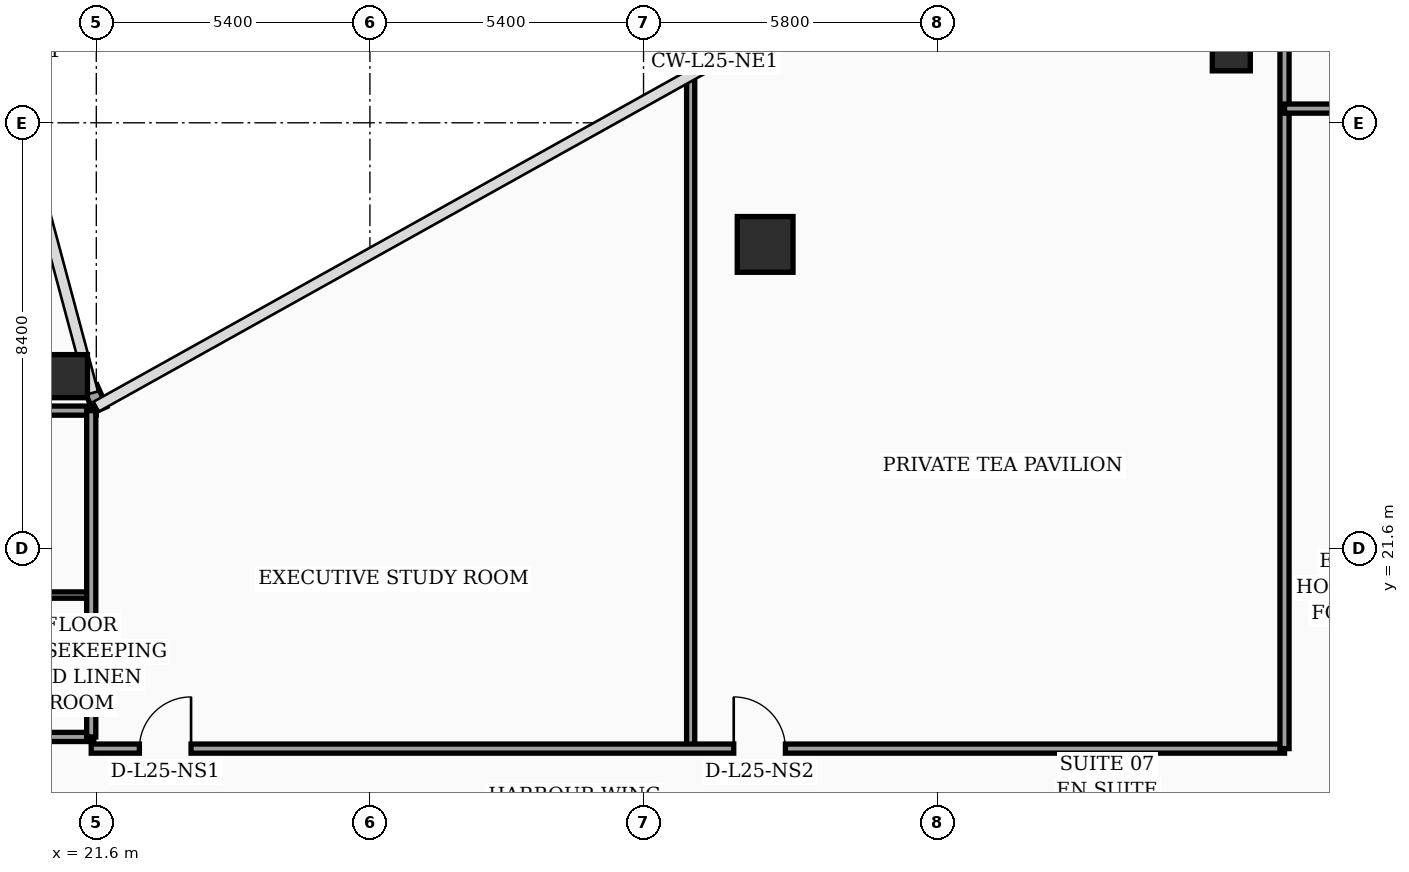
"""IFC4 building model, lengths in metres.
Left out: names, types, materials, properties, quantities, classifications, styles, units other than length and angle.
Written with IfcOpenShell. Run it as: python <this file> out.ifc"""

import sys

from ifc_helpers import new_model, si_unit, direction, frame, frame_2d, origin, origin_2d, place, context, subcontext, project, spatial, rectangle, hollow_rectangle, circle, extrude, element, fill, save


model = new_model("IFC4")
c1 = context("Model", 3, precision=1e-05, world=origin(), true_north=direction((0.0, 1.0)))
c2 = subcontext(c1, "Body", "Model", "MODEL_VIEW")
j1 = project(units=[si_unit("LENGTHUNIT", "METRE"), si_unit("PLANEANGLEUNIT", "RADIAN")], contexts=[c1])
p1 = place(None, origin())
s1 = spatial("IfcSite", under=j1, at=p1, CompositionType="ELEMENT")
p2 = place(p1, origin())
s2 = spatial("IfcBuilding", under=s1, at=p2, CompositionType="ELEMENT")
p3 = place(p2, frame((0.0, 0.0, 105.0)))
s3 = spatial("IfcBuildingStorey", under=s2, at=p3, CompositionType="ELEMENT", Elevation=105.0)
p4 = place(p3, frame((21.0, 25.0, 0.0), z_axis=(0.0, 0.0, 1.0), x_axis=(1.0, 0.0, 0.0)))
e1 = element("IfcColumn", 1, at=p4, inside=s3, PredefinedType="COLUMN", context=c2, shape_type="SweptSolid", body=[
    extrude(hollow_rectangle(XDim=0.85, YDim=0.85, WallThickness=0.036, at=origin_2d()), origin(), (0.0, 0.0, 1.0), 3.56),
])
p5 = place(p3, frame((34.8, 27.6, 0.0), z_axis=(0.0, 0.0, 1.0), x_axis=(1.0, 0.0, 0.0)))
e2 = element("IfcColumn", 2, at=p5, inside=s3, PredefinedType="COLUMN", context=c2, shape_type="SweptSolid", body=[
    extrude(circle(Radius=0.55, at=origin_2d()), origin(), (0.0, 0.0, 1.0), 3.56),
])
p6 = place(p3, frame((44.0, 31.4, 0.0), z_axis=(0.0, 0.0, 1.0), x_axis=(1.0, 0.0, 0.0)))
e3 = element("IfcColumn", 3, at=p6, inside=s3, PredefinedType="COLUMN", context=c2, shape_type="SweptSolid", body=[
    extrude(hollow_rectangle(XDim=0.75, YDim=0.75, WallThickness=0.032, at=origin_2d()), origin(), (0.0, 0.0, 1.0), 3.56),
])
p7 = place(p3, frame((21.68, 24.34, 0.0), z_axis=(0.0, 0.0, 1.0), x_axis=(-0.40758134973, 0.913168901875, 0.0)))
e4 = element("IfcWall", 4, at=p7, inside=s3, PredefinedType="SOLIDWALL", context=c2, shape_type="SweptSolid", body=[
    extrude(rectangle(XDim=0.471, YDim=0.28, at=frame_2d((0.235, 0.0))), origin(), (0.0, 0.0, 1.0), 3.56),
])
p8 = place(p3, frame((17.25, 17.88, 0.0), z_axis=(0.0, 0.0, 1.0), x_axis=(1.0, 0.0, 0.0)))
e5 = element("IfcWall", 5, at=p8, inside=s3, PredefinedType="PARTITIONING", context=c2, shape_type="SweptSolid", body=[
    extrude(rectangle(XDim=4.3, YDim=0.18, at=frame_2d((2.15, 0.0))), origin(), (0.0, 0.0, 1.0), 3.09),
])
p9 = place(p3, frame((17.25, 20.68, 0.0), z_axis=(0.0, 0.0, 1.0), x_axis=(1.0, 0.0, 0.0)))
e6 = element("IfcWall", 6, at=p9, inside=s3, PredefinedType="PARTITIONING", context=c2, shape_type="SweptSolid", body=[
    extrude(rectangle(XDim=4.3, YDim=0.125, at=frame_2d((2.15, 0.0))), origin(), (0.0, 0.0, 1.0), 3.56),
])
p10 = place(p3, frame((17.25, 24.32, 0.0), z_axis=(0.0, 0.0, 1.0), x_axis=(1.0, 0.0, 0.0)))
e7 = element("IfcWall", 7, at=p10, inside=s3, PredefinedType="PARTITIONING", context=c2, shape_type="SweptSolid", body=[
    extrude(rectangle(XDim=4.35, YDim=0.18, at=frame_2d((2.175, 0.0))), origin(), (0.0, 0.0, 1.0), 3.56),
])
p11 = place(p3, frame((21.5, 17.88, 0.0), z_axis=(0.0, 0.0, 1.0), x_axis=(0.0, 1.0, 0.0)))
e8 = element("IfcWall", 8, at=p11, inside=s3, PredefinedType="PARTITIONING", context=c2, shape_type="SweptSolid", body=[
    extrude(rectangle(XDim=6.44, YDim=0.18, at=frame_2d((3.22, 0.0))), origin(), (0.0, 0.0, 1.0), 3.09),
])
p12 = place(p3, frame((33.33, 17.65, 0.0), z_axis=(0.0, 0.0, 1.0), x_axis=(0.0, 1.0, 0.0)))
e9 = element("IfcWall", 9, at=p12, inside=s3, PredefinedType="PARTITIONING", context=c2, shape_type="SweptSolid", body=[
    extrude(rectangle(XDim=13.37, YDim=0.16, at=frame_2d((6.685, 0.0))), origin(), (0.0, 0.0, 1.0), 2.84),
])
p13 = place(p3, frame((21.5, 17.65, 0.0), z_axis=(0.0, 0.0, 1.0), x_axis=(1.0, 0.0, 0.0)))
e10 = element("IfcWall", 10, at=p13, inside=s3, PredefinedType="PARTITIONING", context=c2, shape_type="SweptSolid", body=[
    extrude(rectangle(XDim=23.55, YDim=0.18, at=frame_2d((11.775, 0.0))), origin(), (0.0, 0.0, 1.0), 2.84),
])
p14 = place(p13, frame((0.95, 0.0, 0.0)))
e11 = element("IfcOpeningElement", 11, at=p14, cuts=e10, PredefinedType="OPENING", context=c2, shape_type="SweptSolid", body=[
    extrude(rectangle(XDim=1.02, YDim=2.2, at=frame_2d((0.51, 1.1))), frame((0.0, 0.1, 0.0), z_axis=(0.0, -1.0, 0.0), x_axis=(1.0, 0.0, 0.0)), (0.0, 0.0, 1.0), 0.2),
])
p15 = place(p13, frame((12.68, 0.0, 0.0)))
e12 = element("IfcOpeningElement", 12, at=p15, cuts=e10, PredefinedType="OPENING", context=c2, shape_type="SweptSolid", body=[
    extrude(rectangle(XDim=1.02, YDim=2.2, at=frame_2d((0.51, 1.1))), frame((0.0, 0.1, 0.0), z_axis=(0.0, -1.0, 0.0), x_axis=(1.0, 0.0, 0.0)), (0.0, 0.0, 1.0), 0.2),
])
p16 = place(p3, frame((45.05, 17.65, 0.0), z_axis=(0.0, 0.0, 1.0), x_axis=(0.0, 1.0, 0.0)))
e13 = element("IfcWall", 13, at=p16, inside=s3, PredefinedType="PARTITIONING", context=c2, shape_type="SweptSolid", body=[
    extrude(rectangle(XDim=19.9, YDim=0.18, at=frame_2d((9.95, 0.0))), origin(), (0.0, 0.0, 1.0), 2.84),
])
p17 = place(p3, frame((45.05, 30.28, 0.0), z_axis=(0.0, 0.0, 1.0), x_axis=(1.0, 0.0, 0.0)))
e14 = element("IfcWall", 14, at=p17, inside=s3, PredefinedType="PARTITIONING", context=c2, shape_type="SweptSolid", body=[
    extrude(rectangle(XDim=2.35, YDim=0.18, at=frame_2d((1.175, 0.0))), origin(), (0.0, 0.0, 1.0), 2.84),
])
p18 = place(p14, origin())
e15 = element("IfcDoor", 15, at=p18, inside=s3, OperationType="SINGLE_SWING_RIGHT", PredefinedType="DOOR", context=c2, shape_type="SweptSolid", body=[
    extrude(rectangle(XDim=1.02, YDim=2.2, at=frame_2d((0.51, 1.1))), frame((0.0, 0.025, 0.0), z_axis=(0.0, -1.0, 0.0), x_axis=(1.0, 0.0, 0.0)), (0.0, 0.0, 1.0), 0.05),
])
fill(e11, e15)
p19 = place(p15, origin())
e16 = element("IfcDoor", 16, at=p19, inside=s3, OperationType="SINGLE_SWING_LEFT", PredefinedType="DOOR", context=c2, shape_type="SweptSolid", body=[
    extrude(rectangle(XDim=1.02, YDim=2.2, at=frame_2d((0.51, 1.1))), frame((0.0, 0.025, 0.0), z_axis=(0.0, -1.0, 0.0), x_axis=(1.0, 0.0, 0.0)), (0.0, 0.0, 1.0), 0.05),
])
fill(e12, e16)
save(model, sys.argv[1])
